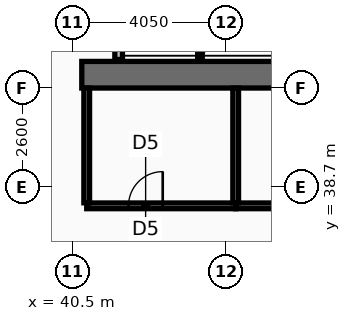
"""IFC4 building model, lengths in metres.
Left out: names, types, materials, properties, quantities, classifications, styles, units other than length and angle.
Written with IfcOpenShell. Run it as: python <this file> out.ifc"""

import sys

from ifc_helpers import new_model, si_unit, direction, frame, frame_2d, origin, place, context, subcontext, project, spatial, rectangle, extrude, element, fill, save


model = new_model("IFC4")
c1 = context("Model", 3, precision=1e-05, world=origin(), true_north=direction((0.0, 1.0)))
c2 = subcontext(c1, "Body", "Model", "MODEL_VIEW")
j1 = project(units=[si_unit("LENGTHUNIT", "METRE"), si_unit("PLANEANGLEUNIT", "RADIAN")], contexts=[c1])
p1 = place(None, origin())
s1 = spatial("IfcSite", under=j1, at=p1, CompositionType="ELEMENT")
p2 = place(p1, origin())
s2 = spatial("IfcBuilding", under=s1, at=p2, CompositionType="ELEMENT")
p3 = place(p2, frame((0.0, 0.0, 150.6)))
s3 = spatial("IfcBuildingStorey", under=s2, at=p3, CompositionType="ELEMENT", Elevation=150.6)
p4 = place(p3, frame((52.05, 41.65, 0.0), z_axis=(0.0, 0.0, 1.0), x_axis=(-1.0, 0.0, 0.0)))
e1 = element("IfcWall", 1, at=p4, inside=s3, PredefinedType="SHEAR", context=c2, shape_type="SweptSolid", body=[
    extrude(rectangle(XDim=11.3, YDim=0.7, at=frame_2d((5.65, 0.0))), origin(), (0.0, 0.0, 1.0), 3.44),
])
p5 = place(p3, frame((41.72, 42.05, 0.0), z_axis=(0.0, 0.0, 1.0), x_axis=(0.0, 1.0, 0.0)))
e2 = element("IfcWall", 2, at=p5, inside=s3, PredefinedType="PARTITIONING", context=c2, shape_type="SweptSolid", body=[
    extrude(rectangle(XDim=2.195, YDim=0.2, at=frame_2d((1.098, 0.0))), origin(), (0.0, 0.0, 1.0), 3.44),
])
p6 = place(p3, frame((43.86, 42.05, 0.0), z_axis=(0.0, 0.0, 1.0), x_axis=(0.0, 1.0, 0.0)))
e3 = element("IfcWall", 3, at=p6, inside=s3, PredefinedType="PARTITIONING", context=c2, shape_type="SweptSolid", body=[
    extrude(rectangle(XDim=2.195, YDim=0.12, at=frame_2d((1.098, 0.0))), origin(), (0.0, 0.0, 1.0), 3.44),
])
p7 = place(p3, frame((40.88, 38.2, 0.0), z_axis=(0.0, 0.0, 1.0), x_axis=(1.0, 0.0, 0.0)))
e4 = element("IfcWall", 4, at=p7, inside=s3, PredefinedType="PARTITIONING", context=c2, shape_type="SweptSolid", body=[
    extrude(rectangle(XDim=3.92, YDim=0.15, at=frame_2d((1.96, 0.0))), origin(), (0.0, 0.0, 1.0), 2.73),
])
p8 = place(p7, frame((1.1, 0.0, 0.0)))
e5 = element("IfcOpeningElement", 5, at=p8, cuts=e4, PredefinedType="OPENING", context=c2, shape_type="SweptSolid", body=[
    extrude(rectangle(XDim=0.9, YDim=2.05, at=frame_2d((0.45, 1.025))), frame((0.0, 0.085, 0.0), z_axis=(0.0, -1.0, 0.0), x_axis=(1.0, 0.0, 0.0)), (0.0, 0.0, 1.0), 0.17),
])
p9 = place(p3, frame((44.8, 38.2, 0.0), z_axis=(0.0, 0.0, 1.0), x_axis=(1.0, 0.0, 0.0)))
e6 = element("IfcWall", 6, at=p9, inside=s3, PredefinedType="PARTITIONING", context=c2, shape_type="SweptSolid", body=[
    extrude(rectangle(XDim=7.15, YDim=0.15, at=frame_2d((3.575, 0.0))), origin(), (0.0, 0.0, 1.0), 2.73),
])
p10 = place(p9, frame((1.1, 0.0, 0.0)))
e7 = element("IfcOpeningElement", 7, at=p10, cuts=e6, PredefinedType="OPENING", context=c2, shape_type="SweptSolid", body=[
    extrude(rectangle(XDim=1.0, YDim=2.05, at=frame_2d((0.5, 1.025))), frame((0.0, 0.085, 0.0), z_axis=(0.0, -1.0, 0.0), x_axis=(1.0, 0.0, 0.0)), (0.0, 0.0, 1.0), 0.17),
])
for number, where, z_axis, x_axis in (
    (8, (40.88, 38.28, 0.0), (0.0, 0.0, 1.0), (0.0, 1.0, 0.0)),
    (9, (44.8, 38.28, 0.0), (0.0, 0.0, 1.0), (0.0, 1.0, 0.0)),
):
    element("IfcWall", number, at=place(p3, frame(where, z_axis=z_axis, x_axis=x_axis)), inside=s3, PredefinedType="PARTITIONING", context=c2, shape_type="SweptSolid", body=[
        extrude(rectangle(XDim=3.02, YDim=0.15, at=frame_2d((1.51, 0.0))), origin(), (0.0, 0.0, 1.0), 3.44),
    ])
p11 = place(p8, origin())
e10 = element("IfcDoor", 10, at=p11, inside=s3, OperationType="SINGLE_SWING_RIGHT", PredefinedType="DOOR", context=c2, shape_type="SweptSolid", body=[
    extrude(rectangle(XDim=0.9, YDim=2.05, at=frame_2d((0.45, 1.025))), frame((0.0, 0.025, 0.0), z_axis=(0.0, -1.0, 0.0), x_axis=(1.0, 0.0, 0.0)), (0.0, 0.0, 1.0), 0.05),
])
fill(e5, e10)
save(model, sys.argv[1])
